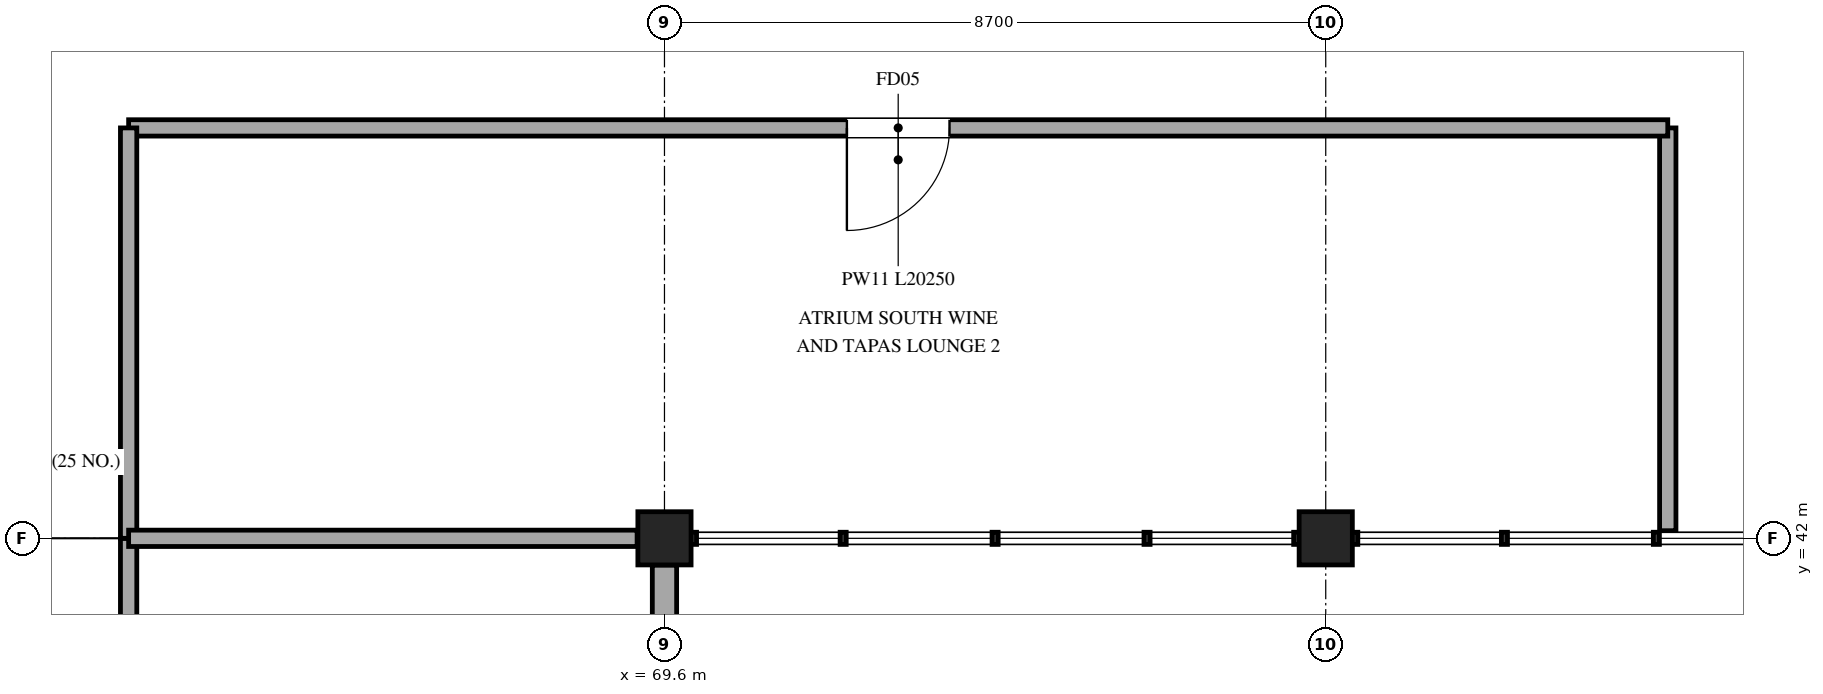
"""IFC4 building model, lengths in metres.
Left out: names, types, materials, properties, quantities, classifications, styles, units other than length and angle.
Written with IfcOpenShell. Run it as: python <this file> out.ifc"""

import sys

from ifc_helpers import new_model, si_unit, direction, frame, frame_2d, origin, origin_2d, place, context, subcontext, project, spatial, rectangle, extrude, element, fill, save


model = new_model("IFC4")
c1 = context("Model", 3, precision=1e-05, world=origin(), true_north=direction((0.0, 1.0)))
c2 = subcontext(c1, "Body", "Model", "MODEL_VIEW")
j1 = project(units=[si_unit("LENGTHUNIT", "METRE"), si_unit("PLANEANGLEUNIT", "RADIAN")], contexts=[c1])
p1 = place(None, origin())
s1 = spatial("IfcSite", under=j1, at=p1, CompositionType="ELEMENT")
p2 = place(p1, origin())
s2 = spatial("IfcBuilding", under=s1, at=p2, CompositionType="ELEMENT")
p3 = place(p2, frame((0.0, 0.0, 26.7)))
s3 = spatial("IfcBuildingStorey", under=s2, at=p3, CompositionType="ELEMENT", Elevation=26.7)
for number, where, z_axis, x_axis in (
    (1, (69.6, 42.0, 0.0), (0.0, 0.0, 1.0), (1.0, 0.0, 0.0)),
    (2, (78.3, 42.0, 0.0), (0.0, 0.0, 1.0), (1.0, 0.0, 0.0)),
):
    element("IfcColumn", number, at=place(p3, frame(where, z_axis=z_axis, x_axis=x_axis)), inside=s3, PredefinedType="COLUMN", context=c2, shape_type="SweptSolid", body=[
        extrude(rectangle(XDim=0.7, YDim=0.7, at=origin_2d()), origin(), (0.0, 0.0, 1.0), 4.8),
    ])
p4 = place(p3, frame((69.6, 41.648, 0.0), z_axis=(0.0, 0.0, 1.0), x_axis=(0.0, -1.0, 0.0)))
e3 = element("IfcWall", 3, at=p4, inside=s3, PredefinedType="STANDARD", context=c2, shape_type="SweptSolid", body=[
    extrude(rectangle(XDim=7.696, YDim=0.32, at=frame_2d((3.848, 0.0))), origin(), (0.0, 0.0, 1.0), 3.955),
])
p5 = place(p4, frame((0.71, 0.0, 0.85)))
e4 = element("IfcOpeningElement", 4, at=p5, cuts=e3, PredefinedType="OPENING", context=c2, shape_type="SweptSolid", body=[
    extrude(rectangle(XDim=2.0, YDim=1.65, at=frame_2d((1.0, 0.825))), frame((0.0, 0.17, 0.0), z_axis=(0.0, -1.0, 0.0), x_axis=(1.0, 0.0, 0.0)), (0.0, 0.0, 1.0), 0.34),
])
p6 = place(p3, frame((62.55, 42.0, 0.0), z_axis=(0.0, 0.0, 1.0), x_axis=(0.0, -1.0, 0.0)))
e5 = element("IfcWall", 5, at=p6, inside=s3, PredefinedType="PARTITIONING", context=c2, shape_type="SweptSolid", body=[
    extrude(rectangle(XDim=4.0, YDim=0.215, at=frame_2d((2.0, 0.0))), origin(), (0.0, 0.0, 1.0), 3.76),
])
p7 = place(p6, frame((1.325, 0.0, 0.0)))
e6 = element("IfcOpeningElement", 6, at=p7, cuts=e5, PredefinedType="OPENING", context=c2, shape_type="SweptSolid", body=[
    extrude(rectangle(XDim=1.35, YDim=2.2, at=frame_2d((0.675, 1.1))), frame((0.0, 0.118, 0.0), z_axis=(0.0, -1.0, 0.0), x_axis=(1.0, 0.0, 0.0)), (0.0, 0.0, 1.0), 0.235),
])
p8 = place(p3, frame((82.8, 42.1, 0.0), z_axis=(0.0, 0.0, 1.0), x_axis=(0.0, 1.0, 0.0)))
e7 = element("IfcWall", 7, at=p8, inside=s3, PredefinedType="PARTITIONING", context=c2, shape_type="SweptSolid", body=[
    extrude(rectangle(XDim=5.3, YDim=0.215, at=frame_2d((2.65, 0.0))), origin(), (0.0, 0.0, 1.0), 3.96),
])
p9 = place(p3, frame((82.8, 47.4, 0.0), z_axis=(0.0, 0.0, 1.0), x_axis=(-1.0, 0.0, 0.0)))
e8 = element("IfcWall", 8, at=p9, inside=s3, PredefinedType="PARTITIONING", context=c2, shape_type="SweptSolid", body=[
    extrude(rectangle(XDim=20.25, YDim=0.215, at=frame_2d((10.125, 0.0))), origin(), (0.0, 0.0, 1.0), 3.76),
])
p10 = place(p9, frame((9.45, 0.0, 0.0)))
e9 = element("IfcOpeningElement", 9, at=p10, cuts=e8, PredefinedType="OPENING", context=c2, shape_type="SweptSolid", body=[
    extrude(rectangle(XDim=1.35, YDim=2.2, at=frame_2d((0.675, 1.1))), frame((0.0, 0.118, 0.0), z_axis=(0.0, -1.0, 0.0), x_axis=(1.0, 0.0, 0.0)), (0.0, 0.0, 1.0), 0.235),
])
p11 = place(p3, frame((62.55, 47.4, 0.0), z_axis=(0.0, 0.0, 1.0), x_axis=(0.0, -1.0, 0.0)))
e10 = element("IfcWall", 10, at=p11, inside=s3, PredefinedType="PARTITIONING", context=c2, shape_type="SweptSolid", body=[
    extrude(rectangle(XDim=5.4, YDim=0.215, at=frame_2d((2.7, 0.0))), origin(), (0.0, 0.0, 1.0), 3.76),
])
p12 = place(p3, frame((62.55, 42.0, 0.0), z_axis=(0.0, 0.0, 1.0), x_axis=(1.0, 0.0, 0.0)))
e11 = element("IfcWall", 11, at=p12, inside=s3, PredefinedType="PARTITIONING", context=c2, shape_type="SweptSolid", body=[
    extrude(rectangle(XDim=6.69, YDim=0.215, at=frame_2d((3.345, 0.0))), origin(), (0.0, 0.0, 1.0), 3.76),
])
p13 = place(p10, origin())
e12 = element("IfcDoor", 12, at=p13, inside=s3, OperationType="SINGLE_SWING_RIGHT", PredefinedType="DOOR", context=c2, shape_type="SweptSolid", body=[
    extrude(rectangle(XDim=1.35, YDim=2.2, at=frame_2d((0.675, 1.1))), frame((0.0, 0.025, 0.0), z_axis=(0.0, -1.0, 0.0), x_axis=(1.0, 0.0, 0.0)), (0.0, 0.0, 1.0), 0.05),
])
fill(e9, e12)
save(model, sys.argv[1])
